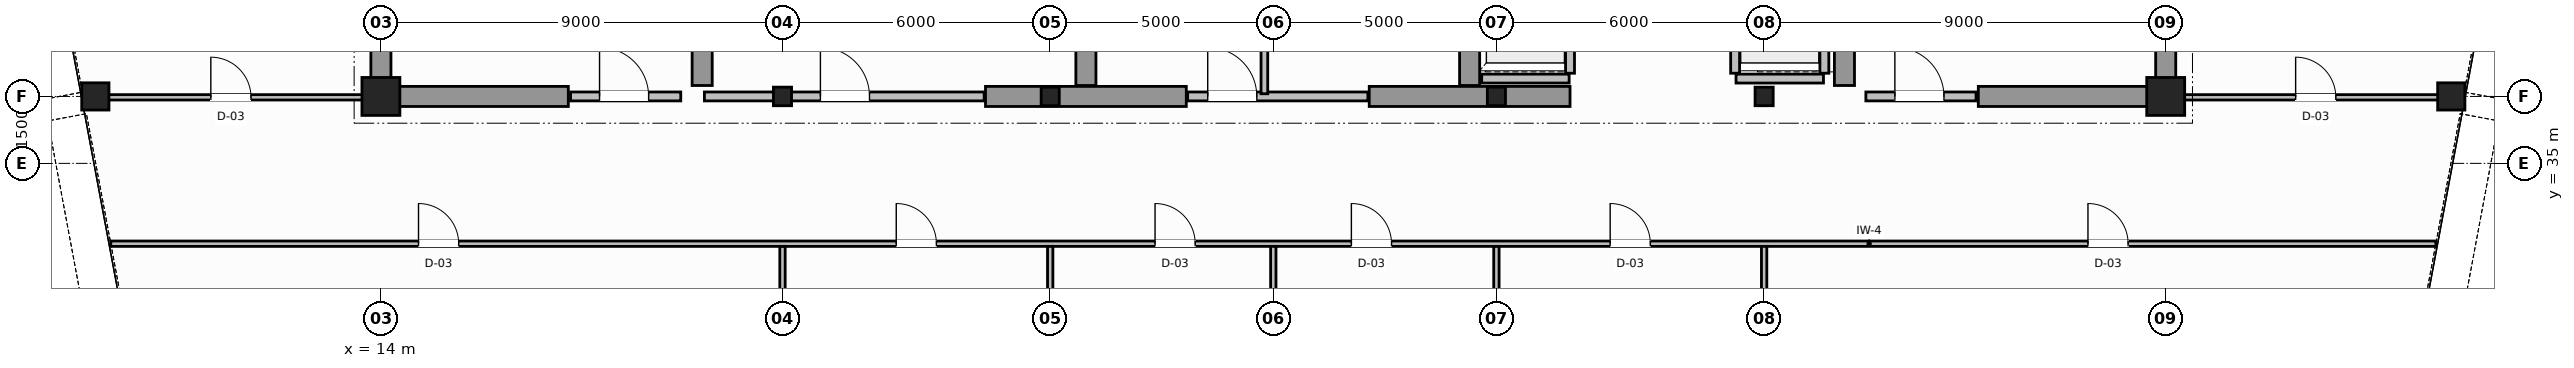
"""IFC4 building model, lengths in metres.
Left out: names, types, materials, properties, quantities, classifications, styles, units other than length and angle.
Written with IfcOpenShell. Run it as: python <this file> out.ifc"""

import sys

from ifc_helpers import new_model, si_unit, direction, frame, frame_2d, origin, origin_2d, place, context, subcontext, project, spatial, rectangle, hollow_circle, i_section, extrude, source, transform, mapped, element, fill, save


model = new_model("IFC4")
c1 = context("Model", 3, precision=1e-05, world=origin(), true_north=direction((0.0, 1.0)))
c2 = subcontext(c1, "Body", "Model", "MODEL_VIEW")
j1 = project(units=[si_unit("LENGTHUNIT", "METRE"), si_unit("PLANEANGLEUNIT", "RADIAN")], contexts=[c1])
p1 = place(None, origin())
s1 = spatial("IfcSite", under=j1, at=p1, CompositionType="ELEMENT")
p2 = place(p1, origin())
s2 = spatial("IfcBuilding", under=s1, at=p2, CompositionType="ELEMENT")
p3 = place(p2, frame((0.0, 0.0, 299.2)))
s3 = spatial("IfcBuildingStorey", under=s2, at=p3, CompositionType="ELEMENT", Elevation=299.2)
m1 = source(origin(), c2, "Body", "SweptSolid", [
    extrude(rectangle(XDim=0.85, YDim=0.85, at=origin_2d()), origin(), (0.0, 0.0, 1.0), 4.6),
])
p4 = place(p3, frame((14.0, 36.5, 0.0), z_axis=(0.0, 0.0, 1.0), x_axis=(1.0, 0.0, 0.0)))
e1 = element("IfcColumn", 1, at=p4, inside=s3, PredefinedType="COLUMN", context=c2, shape_type="MappedRepresentation", body=[
    mapped(m1, transform((0.0, 0.0, 0.0), scale=1.0)),
])
m2 = source(origin(), c2, "Body", "SweptSolid", [
    extrude(i_section(OverallWidth=0.406, OverallDepth=0.416, WebThickness=0.03, FlangeThickness=0.042, FilletRadius=0.015, at=origin_2d()), origin(), (0.0, 0.0, 1.0), 4.6),
])
for number, where, z_axis, x_axis in (
    (2, (23.0, 36.5, 0.0), (0.0, 0.0, 1.0), (1.0, 0.0, 0.0)),
    (3, (29.0, 36.5, 0.0), (0.0, 0.0, 1.0), (1.0, 0.0, 0.0)),
    (4, (39.0, 36.5, 0.0), (0.0, 0.0, 1.0), (1.0, 0.0, 0.0)),
    (5, (45.0, 36.5, 0.0), (0.0, 0.0, 1.0), (1.0, 0.0, 0.0)),
):
    element("IfcColumn", number, at=place(p3, frame(where, z_axis=z_axis, x_axis=x_axis)), inside=s3, PredefinedType="COLUMN", context=c2, shape_type="MappedRepresentation", body=[
        mapped(m2, transform((0.0, 0.0, 0.0), scale=1.0)),
    ])
p5 = place(p3, frame((54.0, 36.5, 0.0), z_axis=(0.0, 0.0, 1.0), x_axis=(1.0, 0.0, 0.0)))
e6 = element("IfcColumn", 6, at=p5, inside=s3, PredefinedType="COLUMN", context=c2, shape_type="MappedRepresentation", body=[
    mapped(m1, transform((0.0, 0.0, 0.0), scale=1.0)),
])
m3 = source(origin(), c2, "Body", "SweptSolid", [
    extrude(hollow_circle(Radius=0.305, WallThickness=0.03, at=origin_2d()), origin(), (0.0, 0.0, 1.0), 4.6),
])
for number, where, z_axis, x_axis in (
    (7, (7.6, 36.5, 0.0), (0.0, 0.0, 1.0), (1.0, 0.0, 0.0)),
    (8, (60.4, 36.5, 0.0), (0.0, 0.0, 1.0), (1.0, 0.0, 0.0)),
):
    element("IfcColumn", number, at=place(p3, frame(where, z_axis=z_axis, x_axis=x_axis)), inside=s3, PredefinedType="COLUMN", context=c2, shape_type="MappedRepresentation", body=[
        mapped(m3, transform((0.0, 0.0, 0.0), scale=1.0)),
    ])
for number, where, z_axis, x_axis in (
    (9, (14.0, 36.5, 0.0), (0.0, 0.0, 1.0), (0.0, 1.0, 0.0)),
    (10, (54.0, 36.5, 0.0), (0.0, 0.0, 1.0), (0.0, 1.0, 0.0)),
):
    element("IfcWall", number, at=place(p3, frame(where, z_axis=z_axis, x_axis=x_axis)), inside=s3, PredefinedType="SHEAR", context=c2, shape_type="SweptSolid", body=[
        extrude(rectangle(XDim=14.5, YDim=0.45, at=frame_2d((7.25, 0.0))), origin(), (0.0, 0.0, 1.0), 4.6),
    ])
p6 = place(p3, frame((14.245, 36.5, 0.0), z_axis=(0.0, 0.0, 1.0), x_axis=(1.0, 0.0, 0.0)))
e11 = element("IfcWall", 11, at=p6, inside=s3, PredefinedType="SHEAR", context=c2, shape_type="SweptSolid", body=[
    extrude(rectangle(XDim=3.955, YDim=0.45, at=frame_2d((1.978, 0.0))), origin(), (0.0, 0.0, 1.0), 3.3),
])
for number, where, z_axis, x_axis in (
    (12, (27.55, 36.5, 0.0), (0.0, 0.0, 1.0), (1.0, 0.0, 0.0)),
    (13, (36.15, 36.5, 0.0), (0.0, 0.0, 1.0), (1.0, 0.0, 0.0)),
):
    element("IfcWall", number, at=place(p3, frame(where, z_axis=z_axis, x_axis=x_axis)), inside=s3, PredefinedType="SHEAR", context=c2, shape_type="SweptSolid", body=[
        extrude(rectangle(XDim=4.5, YDim=0.45, at=frame_2d((2.25, 0.0))), origin(), (0.0, 0.0, 1.0), 4.6),
    ])
p7 = place(p3, frame((49.8, 36.5, 0.0), z_axis=(0.0, 0.0, 1.0), x_axis=(1.0, 0.0, 0.0)))
e14 = element("IfcWall", 14, at=p7, inside=s3, PredefinedType="SHEAR", context=c2, shape_type="SweptSolid", body=[
    extrude(rectangle(XDim=3.955, YDim=0.45, at=frame_2d((1.978, 0.0))), origin(), (0.0, 0.0, 1.0), 3.3),
])
for number, where, z_axis, x_axis in (
    (15, (21.2, 36.745, 0.0), (0.0, 0.0, 1.0), (0.0, 1.0, 0.0)),
    (16, (29.8, 36.745, 0.0), (0.0, 0.0, 1.0), (0.0, 1.0, 0.0)),
    (17, (38.4, 36.745, 0.0), (0.0, 0.0, 1.0), (0.0, 1.0, 0.0)),
    (18, (46.8, 36.745, 0.0), (0.0, 0.0, 1.0), (0.0, 1.0, 0.0)),
):
    element("IfcWall", number, at=place(p3, frame(where, z_axis=z_axis, x_axis=x_axis)), inside=s3, PredefinedType="SHEAR", context=c2, shape_type="SweptSolid", body=[
        extrude(rectangle(XDim=9.455, YDim=0.45, at=frame_2d((4.728, 0.0))), origin(), (0.0, 0.0, 1.0), 4.6),
    ])
p8 = place(p3, frame((18.25, 36.5, 0.0), z_axis=(0.0, 0.0, 1.0), x_axis=(1.0, 0.0, 0.0)))
e19 = element("IfcWall", 19, at=p8, inside=s3, PredefinedType="SOLIDWALL", context=c2, shape_type="SweptSolid", body=[
    extrude(rectangle(XDim=2.47, YDim=0.2, at=frame_2d((1.235, 0.0))), origin(), (0.0, 0.0, 1.0), 3.29),
])
p9 = place(p8, frame((0.65, 0.0, 0.0)))
e20 = element("IfcOpeningElement", 20, at=p9, cuts=e19, PredefinedType="OPENING", context=c2, shape_type="SweptSolid", body=[
    extrude(rectangle(XDim=1.1, YDim=2.15, at=frame_2d((0.55, 1.075))), frame((0.0, 0.11, 0.0), z_axis=(0.0, -1.0, 0.0), x_axis=(1.0, 0.0, 0.0)), (0.0, 0.0, 1.0), 0.22),
])
p10 = place(p3, frame((47.28, 36.5, 0.0), z_axis=(0.0, 0.0, 1.0), x_axis=(1.0, 0.0, 0.0)))
e21 = element("IfcWall", 21, at=p10, inside=s3, PredefinedType="SOLIDWALL", context=c2, shape_type="SweptSolid", body=[
    extrude(rectangle(XDim=2.47, YDim=0.2, at=frame_2d((1.235, 0.0))), origin(), (0.0, 0.0, 1.0), 3.29),
])
p11 = place(p10, frame((0.65, 0.0, 0.0)))
e22 = element("IfcOpeningElement", 22, at=p11, cuts=e21, PredefinedType="OPENING", context=c2, shape_type="SweptSolid", body=[
    extrude(rectangle(XDim=1.1, YDim=2.15, at=frame_2d((0.55, 1.075))), frame((0.0, 0.11, 0.0), z_axis=(0.0, -1.0, 0.0), x_axis=(1.0, 0.0, 0.0)), (0.0, 0.0, 1.0), 0.22),
])
p12 = place(p3, frame((38.67, 36.9, 0.0), z_axis=(0.0, 0.0, 1.0), x_axis=(1.0, 0.0, 0.0)))
e23 = element("IfcWall", 23, at=p12, inside=s3, PredefinedType="SOLIDWALL", context=c2, shape_type="SweptSolid", body=[
    extrude(rectangle(XDim=1.96, YDim=0.2, at=frame_2d((0.98, 0.0))), origin(), (0.0, 0.0, 1.0), 3.09),
])
p13 = place(p3, frame((40.65, 37.02, 0.0), z_axis=(0.0, 0.0, 1.0), x_axis=(0.0, 1.0, 0.0)))
e24 = element("IfcWall", 24, at=p13, inside=s3, PredefinedType="SOLIDWALL", context=c2, shape_type="SweptSolid", body=[
    extrude(rectangle(XDim=2.56, YDim=0.2, at=frame_2d((1.28, 0.0))), origin(), (0.0, 0.0, 1.0), 4.3),
])
p14 = place(p3, frame((44.37, 36.9, 0.0), z_axis=(0.0, 0.0, 1.0), x_axis=(1.0, 0.0, 0.0)))
e25 = element("IfcWall", 25, at=p14, inside=s3, PredefinedType="SOLIDWALL", context=c2, shape_type="SweptSolid", body=[
    extrude(rectangle(XDim=1.96, YDim=0.2, at=frame_2d((0.98, 0.0))), origin(), (0.0, 0.0, 1.0), 3.09),
])
for number, where, z_axis, x_axis in (
    (26, (44.35, 37.02, 0.0), (0.0, 0.0, 1.0), (0.0, 1.0, 0.0)),
    (27, (46.35, 37.02, 0.0), (0.0, 0.0, 1.0), (0.0, 1.0, 0.0)),
):
    element("IfcWall", number, at=place(p3, frame(where, z_axis=z_axis, x_axis=x_axis)), inside=s3, PredefinedType="SOLIDWALL", context=c2, shape_type="SweptSolid", body=[
        extrude(rectangle(XDim=2.56, YDim=0.2, at=frame_2d((1.28, 0.0))), origin(), (0.0, 0.0, 1.0), 4.3),
    ])
p15 = place(p3, frame((21.25, 36.5, 0.0), z_axis=(0.0, 0.0, 1.0), x_axis=(1.0, 0.0, 0.0)))
e28 = element("IfcWall", 28, at=p15, inside=s3, PredefinedType="SOLIDWALL", context=c2, shape_type="SweptSolid", body=[
    extrude(rectangle(XDim=6.27, YDim=0.2, at=frame_2d((3.135, 0.0))), origin(), (0.0, 0.0, 1.0), 3.09),
])
p16 = place(p15, frame((2.6, 0.0, 0.0)))
e29 = element("IfcOpeningElement", 29, at=p16, cuts=e28, PredefinedType="OPENING", context=c2, shape_type="SweptSolid", body=[
    extrude(rectangle(XDim=1.1, YDim=2.15, at=frame_2d((0.55, 1.075))), frame((0.0, 0.11, 0.0), z_axis=(0.0, -1.0, 0.0), x_axis=(1.0, 0.0, 0.0)), (0.0, 0.0, 1.0), 0.22),
])
p17 = place(p3, frame((32.08, 36.5, 0.0), z_axis=(0.0, 0.0, 1.0), x_axis=(1.0, 0.0, 0.0)))
e30 = element("IfcWall", 30, at=p17, inside=s3, PredefinedType="SOLIDWALL", context=c2, shape_type="SweptSolid", body=[
    extrude(rectangle(XDim=4.04, YDim=0.2, at=frame_2d((2.02, 0.0))), origin(), (0.0, 0.0, 1.0), 3.09),
])
p18 = place(p17, frame((0.45, 0.0, 0.0)))
e31 = element("IfcOpeningElement", 31, at=p18, cuts=e30, PredefinedType="OPENING", context=c2, shape_type="SweptSolid", body=[
    extrude(rectangle(XDim=1.1, YDim=2.15, at=frame_2d((0.55, 1.075))), frame((0.0, 0.11, 0.0), z_axis=(0.0, -1.0, 0.0), x_axis=(1.0, 0.0, 0.0)), (0.0, 0.0, 1.0), 0.22),
])
p19 = place(p3, frame((33.8, 36.56, 0.0), z_axis=(0.0, 0.0, 1.0), x_axis=(0.0, 1.0, 0.0)))
e32 = element("IfcWall", 32, at=p19, inside=s3, PredefinedType="PARTITIONING", context=c2, shape_type="SweptSolid", body=[
    extrude(rectangle(XDim=9.58, YDim=0.15, at=frame_2d((4.79, 0.0))), origin(), (0.0, 0.0, 1.0), 4.3),
])
p20 = place(p19, frame((4.2, 0.0, 0.0)))
e33 = element("IfcOpeningElement", 33, at=p20, cuts=e32, PredefinedType="OPENING", context=c2, shape_type="SweptSolid", body=[
    extrude(rectangle(XDim=0.9, YDim=2.1, at=frame_2d((0.45, 1.05))), frame((0.0, 0.085, 0.0), z_axis=(0.0, -1.0, 0.0), x_axis=(1.0, 0.0, 0.0)), (0.0, 0.0, 1.0), 0.17),
])
p21 = place(p3, frame((7.946, 33.2, 0.0), z_axis=(0.0, 0.0, 1.0), x_axis=(1.0, 0.0, 0.0)))
e34 = element("IfcWall", 34, at=p21, inside=s3, PredefinedType="PARTITIONING", context=c2, shape_type="SweptSolid", body=[
    extrude(rectangle(XDim=52.109, YDim=0.12, at=frame_2d((26.054, 0.0))), origin(), (0.0, 0.0, 1.0), 3.93),
])
p22 = place(p21, frame((6.897, 0.0, 0.0)))
e35 = element("IfcOpeningElement", 35, at=p22, cuts=e34, PredefinedType="OPENING", context=c2, shape_type="SweptSolid", body=[
    extrude(rectangle(XDim=0.9, YDim=2.15, at=frame_2d((0.45, 1.075))), frame((0.0, 0.07, 0.0), z_axis=(0.0, -1.0, 0.0), x_axis=(1.0, 0.0, 0.0)), (0.0, 0.0, 1.0), 0.14),
])
p23 = place(p21, frame((17.604, 0.0, 0.0)))
e36 = element("IfcOpeningElement", 36, at=p23, cuts=e34, PredefinedType="OPENING", context=c2, shape_type="SweptSolid", body=[
    extrude(rectangle(XDim=0.9, YDim=2.15, at=frame_2d((0.45, 1.075))), frame((0.0, 0.07, 0.0), z_axis=(0.0, -1.0, 0.0), x_axis=(1.0, 0.0, 0.0)), (0.0, 0.0, 1.0), 0.14),
])
p24 = place(p21, frame((23.404, 0.0, 0.0)))
e37 = element("IfcOpeningElement", 37, at=p24, cuts=e34, PredefinedType="OPENING", context=c2, shape_type="SweptSolid", body=[
    extrude(rectangle(XDim=0.9, YDim=2.15, at=frame_2d((0.45, 1.075))), frame((0.0, 0.07, 0.0), z_axis=(0.0, -1.0, 0.0), x_axis=(1.0, 0.0, 0.0)), (0.0, 0.0, 1.0), 0.14),
])
p25 = place(p21, frame((27.804, 0.0, 0.0)))
e38 = element("IfcOpeningElement", 38, at=p25, cuts=e34, PredefinedType="OPENING", context=c2, shape_type="SweptSolid", body=[
    extrude(rectangle(XDim=0.9, YDim=2.15, at=frame_2d((0.45, 1.075))), frame((0.0, 0.07, 0.0), z_axis=(0.0, -1.0, 0.0), x_axis=(1.0, 0.0, 0.0)), (0.0, 0.0, 1.0), 0.14),
])
p26 = place(p21, frame((33.604, 0.0, 0.0)))
e39 = element("IfcOpeningElement", 39, at=p26, cuts=e34, PredefinedType="OPENING", context=c2, shape_type="SweptSolid", body=[
    extrude(rectangle(XDim=0.9, YDim=2.15, at=frame_2d((0.45, 1.075))), frame((0.0, 0.07, 0.0), z_axis=(0.0, -1.0, 0.0), x_axis=(1.0, 0.0, 0.0)), (0.0, 0.0, 1.0), 0.14),
])
p27 = place(p21, frame((44.312, 0.0, 0.0)))
e40 = element("IfcOpeningElement", 40, at=p27, cuts=e34, PredefinedType="OPENING", context=c2, shape_type="SweptSolid", body=[
    extrude(rectangle(XDim=0.9, YDim=2.15, at=frame_2d((0.45, 1.075))), frame((0.0, 0.07, 0.0), z_axis=(0.0, -1.0, 0.0), x_axis=(1.0, 0.0, 0.0)), (0.0, 0.0, 1.0), 0.14),
])
p28 = place(p3, frame((7.336, 36.48, 0.0), z_axis=(0.0, 0.0, 1.0), x_axis=(1.0, 0.0, 0.0)))
e41 = element("IfcWall", 41, at=p28, inside=s3, PredefinedType="PARTITIONING", context=c2, shape_type="SweptSolid", body=[
    extrude(rectangle(XDim=6.604, YDim=0.12, at=frame_2d((3.302, 0.0))), origin(), (0.0, 0.0, 1.0), 3.09),
])
p29 = place(p28, frame((2.852, 0.0, 0.0)))
e42 = element("IfcOpeningElement", 42, at=p29, cuts=e41, PredefinedType="OPENING", context=c2, shape_type="SweptSolid", body=[
    extrude(rectangle(XDim=0.9, YDim=2.15, at=frame_2d((0.45, 1.075))), frame((0.0, 0.07, 0.0), z_axis=(0.0, -1.0, 0.0), x_axis=(1.0, 0.0, 0.0)), (0.0, 0.0, 1.0), 0.14),
])
p30 = place(p3, frame((54.06, 36.48, 0.0), z_axis=(0.0, 0.0, 1.0), x_axis=(1.0, 0.0, 0.0)))
e43 = element("IfcWall", 43, at=p30, inside=s3, PredefinedType="PARTITIONING", context=c2, shape_type="SweptSolid", body=[
    extrude(rectangle(XDim=6.604, YDim=0.12, at=frame_2d((3.302, 0.0))), origin(), (0.0, 0.0, 1.0), 3.09),
])
p31 = place(p30, frame((2.852, 0.0, 0.0)))
e44 = element("IfcOpeningElement", 44, at=p31, cuts=e43, PredefinedType="OPENING", context=c2, shape_type="SweptSolid", body=[
    extrude(rectangle(XDim=0.9, YDim=2.15, at=frame_2d((0.45, 1.075))), frame((0.0, 0.07, 0.0), z_axis=(0.0, -1.0, 0.0), x_axis=(1.0, 0.0, 0.0)), (0.0, 0.0, 1.0), 0.14),
])
for number, where, z_axis, x_axis in (
    (45, (23.0, 28.14, 0.0), (0.0, 0.0, 1.0), (0.0, 1.0, 0.0)),
    (46, (29.0, 28.14, 0.0), (0.0, 0.0, 1.0), (0.0, 1.0, 0.0)),
    (47, (39.0, 28.14, 0.0), (0.0, 0.0, 1.0), (0.0, 1.0, 0.0)),
    (48, (45.0, 28.14, 0.0), (0.0, 0.0, 1.0), (0.0, 1.0, 0.0)),
):
    element("IfcWall", number, at=place(p3, frame(where, z_axis=z_axis, x_axis=x_axis)), inside=s3, PredefinedType="PARTITIONING", context=c2, shape_type="SweptSolid", body=[
        extrude(rectangle(XDim=5.0, YDim=0.12, at=frame_2d((2.5, 0.0))), origin(), (0.0, 0.0, 1.0), 3.09),
    ])
p32 = place(p3, frame((34.0, 17.44, 0.0), z_axis=(0.0, 0.0, 1.0), x_axis=(0.0, 1.0, 0.0)))
e49 = element("IfcWall", 49, at=p32, inside=s3, PredefinedType="PARTITIONING", context=c2, shape_type="SweptSolid", body=[
    extrude(rectangle(XDim=15.7, YDim=0.12, at=frame_2d((7.85, 0.0))), origin(), (0.0, 0.0, 1.0), 4.3),
])
m4 = source(origin(), c2, "Body", "SweptSolid", [
    extrude(rectangle(XDim=1.1, YDim=2.15, at=frame_2d((0.55, 1.075))), frame((0.0, 0.025, 0.0), z_axis=(0.0, -1.0, 0.0), x_axis=(1.0, 0.0, 0.0)), (0.0, 0.0, 1.0), 0.05),
])
p33 = place(p9, origin())
e50 = element("IfcDoor", 50, at=p33, inside=s3, OperationType="SINGLE_SWING_RIGHT", PredefinedType="DOOR", context=c2, shape_type="MappedRepresentation", body=[
    mapped(m4, transform((0.0, 0.0, 0.0), scale=1.0)),
])
fill(e20, e50)
p34 = place(p11, origin())
e51 = element("IfcDoor", 51, at=p34, inside=s3, OperationType="SINGLE_SWING_LEFT", PredefinedType="DOOR", context=c2, shape_type="MappedRepresentation", body=[
    mapped(m4, transform((0.0, 0.0, 0.0), scale=1.0)),
])
fill(e22, e51)
p35 = place(p16, origin())
e52 = element("IfcDoor", 52, at=p35, inside=s3, OperationType="SINGLE_SWING_LEFT", PredefinedType="DOOR", context=c2, shape_type="MappedRepresentation", body=[
    mapped(m4, transform((0.0, 0.0, 0.0), scale=1.0)),
])
fill(e29, e52)
p36 = place(p18, origin())
e53 = element("IfcDoor", 53, at=p36, inside=s3, OperationType="SINGLE_SWING_LEFT", PredefinedType="DOOR", context=c2, shape_type="MappedRepresentation", body=[
    mapped(m4, transform((0.0, 0.0, 0.0), scale=1.0)),
])
fill(e31, e53)
m5 = source(origin(), c2, "Body", "SweptSolid", [
    extrude(rectangle(XDim=0.9, YDim=2.15, at=frame_2d((0.45, 1.075))), frame((0.0, 0.025, 0.0), z_axis=(0.0, -1.0, 0.0), x_axis=(1.0, 0.0, 0.0)), (0.0, 0.0, 1.0), 0.05),
])
p37 = place(p29, origin())
e54 = element("IfcDoor", 54, at=p37, inside=s3, OperationType="SINGLE_SWING_LEFT", PredefinedType="DOOR", context=c2, shape_type="MappedRepresentation", body=[
    mapped(m5, transform((0.0, 0.0, 0.0), scale=1.0)),
])
fill(e42, e54)
p38 = place(p31, origin())
e55 = element("IfcDoor", 55, at=p38, inside=s3, OperationType="SINGLE_SWING_RIGHT", PredefinedType="DOOR", context=c2, shape_type="MappedRepresentation", body=[
    mapped(m5, transform((0.0, 0.0, 0.0), scale=1.0)),
])
fill(e44, e55)
p39 = place(p22, origin())
e56 = element("IfcDoor", 56, at=p39, inside=s3, OperationType="SINGLE_SWING_LEFT", PredefinedType="DOOR", context=c2, shape_type="MappedRepresentation", body=[
    mapped(m5, transform((0.0, 0.0, 0.0), scale=1.0)),
])
fill(e35, e56)
p40 = place(p23, origin())
e57 = element("IfcDoor", 57, at=p40, inside=s3, OperationType="SINGLE_SWING_RIGHT", PredefinedType="DOOR", context=c2, shape_type="MappedRepresentation", body=[
    mapped(m5, transform((0.0, 0.0, 0.0), scale=1.0)),
])
fill(e36, e57)
p41 = place(p24, origin())
e58 = element("IfcDoor", 58, at=p41, inside=s3, OperationType="SINGLE_SWING_LEFT", PredefinedType="DOOR", context=c2, shape_type="MappedRepresentation", body=[
    mapped(m5, transform((0.0, 0.0, 0.0), scale=1.0)),
])
fill(e37, e58)
p42 = place(p25, origin())
e59 = element("IfcDoor", 59, at=p42, inside=s3, OperationType="SINGLE_SWING_RIGHT", PredefinedType="DOOR", context=c2, shape_type="MappedRepresentation", body=[
    mapped(m5, transform((0.0, 0.0, 0.0), scale=1.0)),
])
fill(e38, e59)
p43 = place(p26, origin())
e60 = element("IfcDoor", 60, at=p43, inside=s3, OperationType="SINGLE_SWING_LEFT", PredefinedType="DOOR", context=c2, shape_type="MappedRepresentation", body=[
    mapped(m5, transform((0.0, 0.0, 0.0), scale=1.0)),
])
fill(e39, e60)
p44 = place(p27, origin())
e61 = element("IfcDoor", 61, at=p44, inside=s3, OperationType="SINGLE_SWING_RIGHT", PredefinedType="DOOR", context=c2, shape_type="MappedRepresentation", body=[
    mapped(m5, transform((0.0, 0.0, 0.0), scale=1.0)),
])
fill(e40, e61)
save(model, sys.argv[1])
